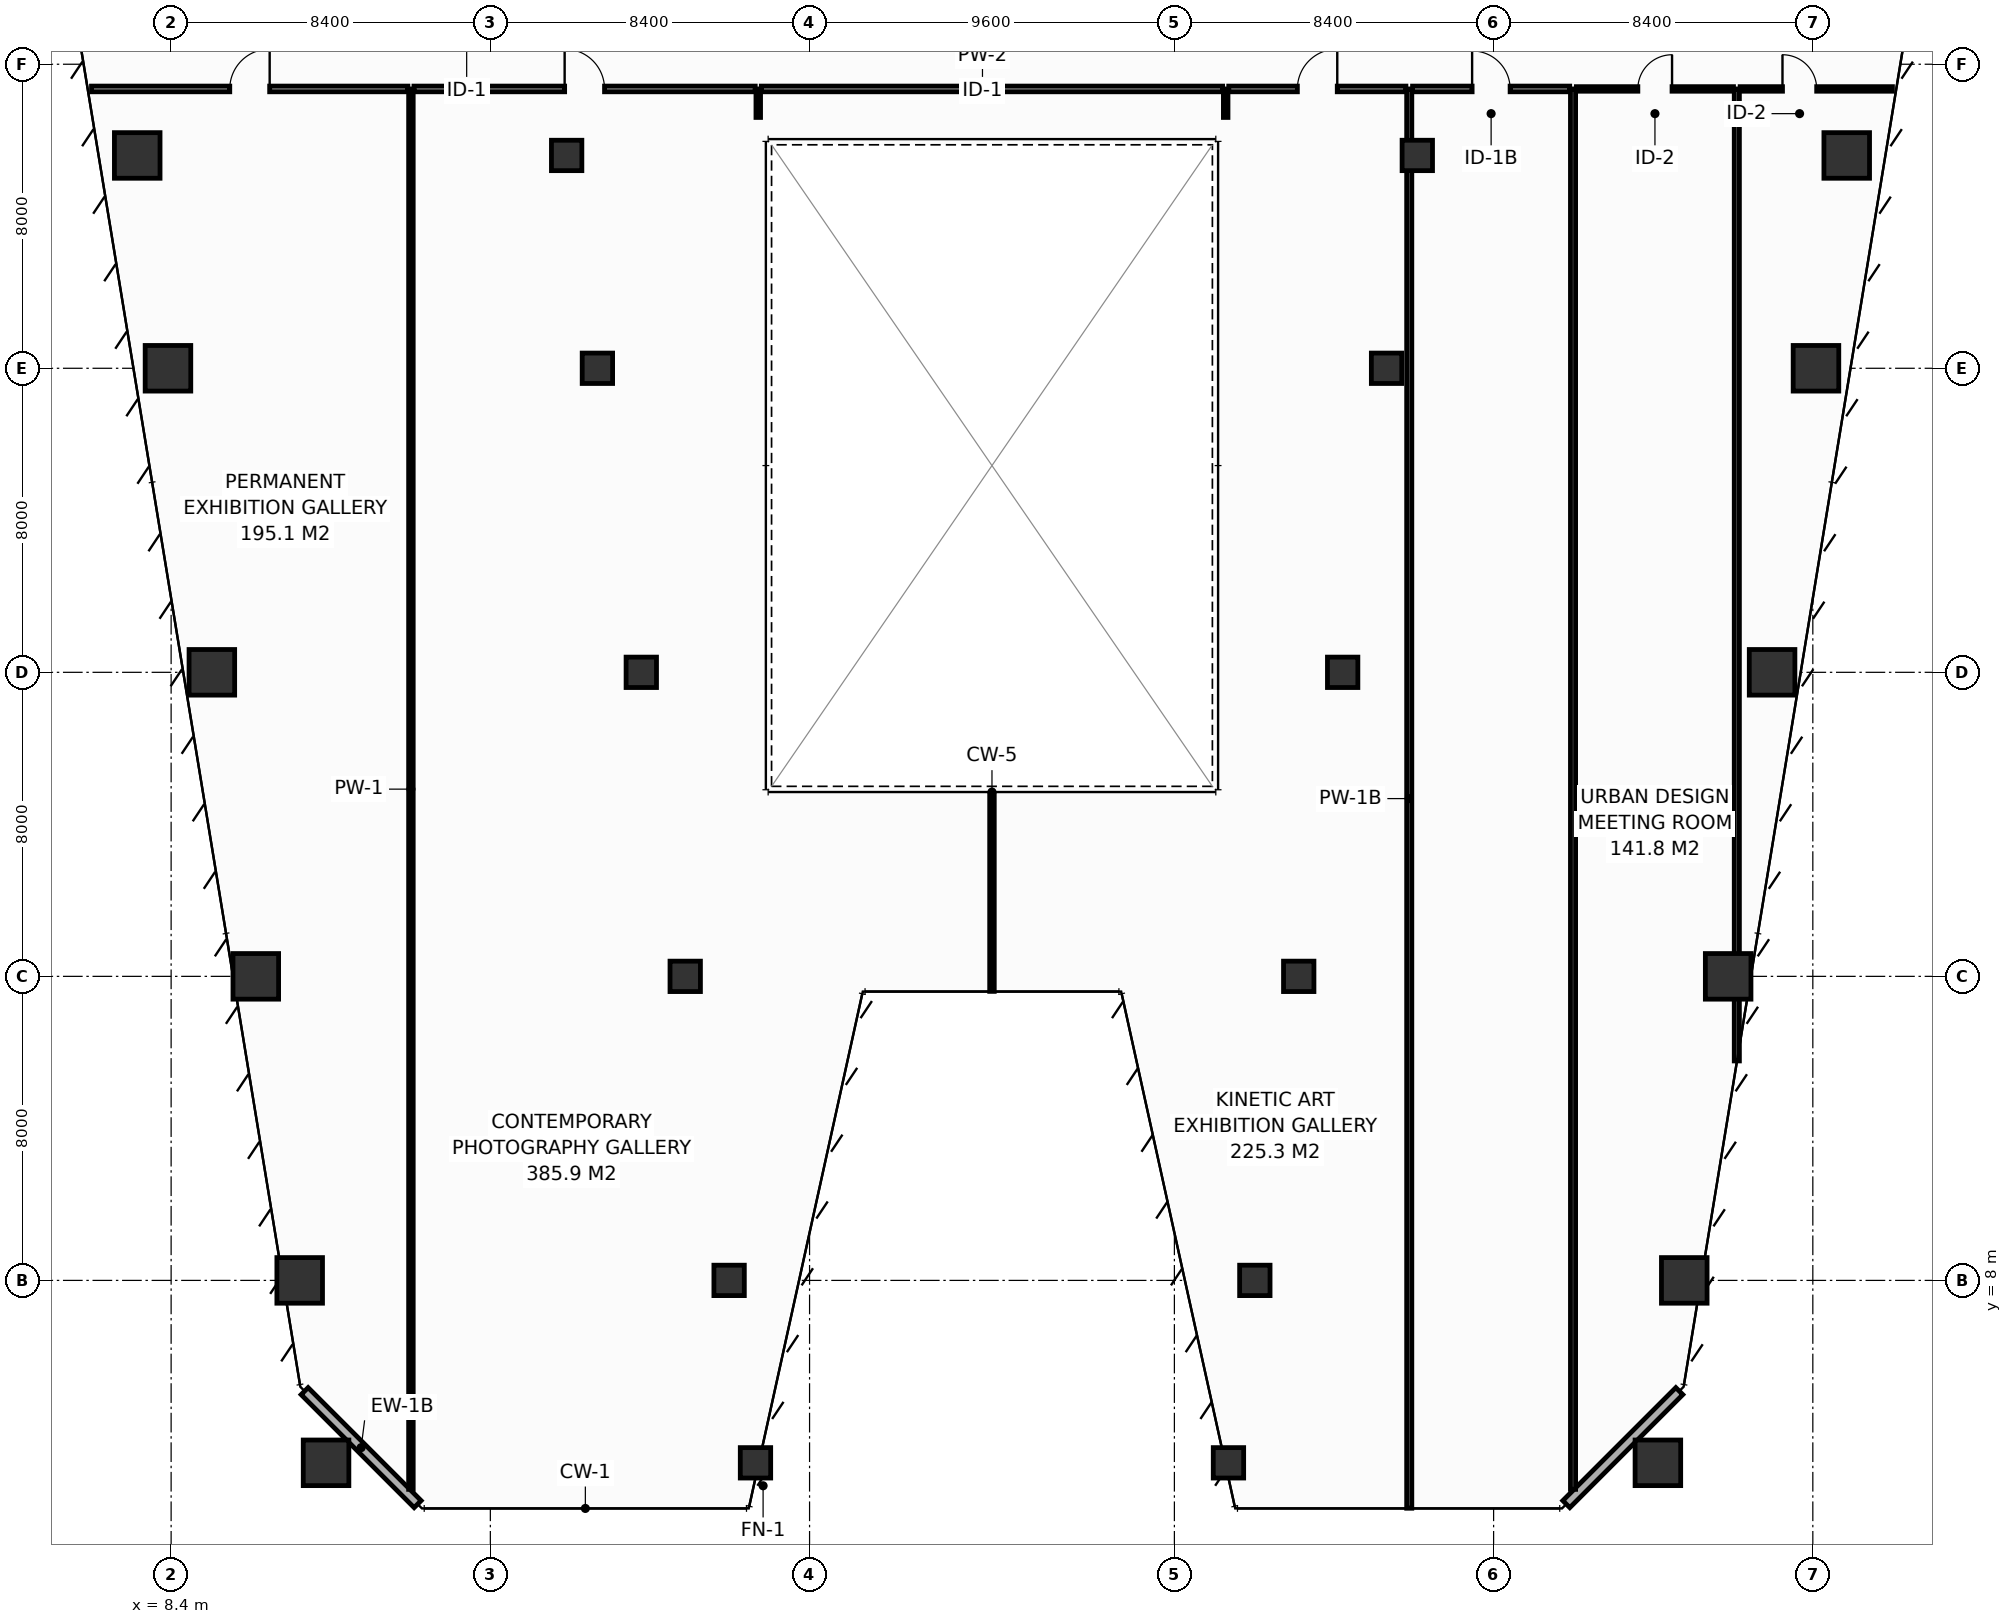
"""IFC4 building model, lengths in metres.
Left out: names, types, materials, properties, quantities, classifications, styles, units other than length and angle.
Written with IfcOpenShell. Run it as: python <this file> out.ifc"""

import sys

from ifc_helpers import new_model, si_unit, direction, frame, frame_2d, origin, origin_2d, place, context, subcontext, project, spatial, rectangle, hollow_rectangle, extrude, element, fill, save


model = new_model("IFC4")
c1 = context("Model", 3, precision=1e-05, world=origin(), true_north=direction((0.0, 1.0)))
c2 = subcontext(c1, "Body", "Model", "MODEL_VIEW")
j1 = project(units=[si_unit("LENGTHUNIT", "METRE"), si_unit("PLANEANGLEUNIT", "RADIAN")], contexts=[c1])
p1 = place(None, origin())
s1 = spatial("IfcSite", under=j1, at=p1, CompositionType="ELEMENT")
p2 = place(p1, origin())
s2 = spatial("IfcBuilding", under=s1, at=p2, CompositionType="ELEMENT")
p3 = place(p2, frame((0.0, 0.0, 64.8)))
s3 = spatial("IfcBuildingStorey", under=s2, at=p3, CompositionType="ELEMENT", Elevation=64.8)
for number, where, z_axis, x_axis in (
    (1, (12.477, 3.2, 0.0), (0.0, 0.0, 1.0), (1.0, 0.0, 0.0)),
    (2, (47.523, 3.2, 0.0), (0.0, 0.0, 1.0), (1.0, 0.0, 0.0)),
):
    element("IfcColumn", number, at=place(p3, frame(where, z_axis=z_axis, x_axis=x_axis)), inside=s3, PredefinedType="COLUMN", context=c2, shape_type="SweptSolid", body=[
        extrude(hollow_rectangle(XDim=1.2, YDim=1.2, WallThickness=0.055, at=origin_2d()), origin(), (0.0, 0.0, 1.0), 4.4),
    ])
for number, where, z_axis, x_axis in (
    (3, (23.777, 3.2, 0.0), (0.0, 0.0, 1.0), (1.0, 0.0, 0.0)),
    (4, (36.223, 3.2, 0.0), (0.0, 0.0, 1.0), (1.0, 0.0, 0.0)),
):
    element("IfcColumn", number, at=place(p3, frame(where, z_axis=z_axis, x_axis=x_axis)), inside=s3, PredefinedType="COLUMN", context=c2, shape_type="SweptSolid", body=[
        extrude(hollow_rectangle(XDim=0.8, YDim=0.8, WallThickness=0.036, at=origin_2d()), origin(), (0.0, 0.0, 1.0), 4.4),
    ])
for number, where, z_axis, x_axis in (
    (5, (11.783, 8.0, 0.0), (0.0, 0.0, 1.0), (1.0, 0.0, 0.0)),
    (6, (48.217, 8.0, 0.0), (0.0, 0.0, 1.0), (1.0, 0.0, 0.0)),
):
    element("IfcColumn", number, at=place(p3, frame(where, z_axis=z_axis, x_axis=x_axis)), inside=s3, PredefinedType="COLUMN", context=c2, shape_type="SweptSolid", body=[
        extrude(hollow_rectangle(XDim=1.2, YDim=1.2, WallThickness=0.055, at=origin_2d()), origin(), (0.0, 0.0, 1.0), 4.4),
    ])
for number, where, z_axis, x_axis in (
    (7, (23.083, 8.0, 0.0), (0.0, 0.0, 1.0), (1.0, 0.0, 0.0)),
    (8, (36.917, 8.0, 0.0), (0.0, 0.0, 1.0), (1.0, 0.0, 0.0)),
):
    element("IfcColumn", number, at=place(p3, frame(where, z_axis=z_axis, x_axis=x_axis)), inside=s3, PredefinedType="COLUMN", context=c2, shape_type="SweptSolid", body=[
        extrude(hollow_rectangle(XDim=0.8, YDim=0.8, WallThickness=0.036, at=origin_2d()), origin(), (0.0, 0.0, 1.0), 4.4),
    ])
for number, where, z_axis, x_axis in (
    (9, (10.628, 16.0, 0.0), (0.0, 0.0, 1.0), (1.0, 0.0, 0.0)),
    (10, (49.372, 16.0, 0.0), (0.0, 0.0, 1.0), (1.0, 0.0, 0.0)),
):
    element("IfcColumn", number, at=place(p3, frame(where, z_axis=z_axis, x_axis=x_axis)), inside=s3, PredefinedType="COLUMN", context=c2, shape_type="SweptSolid", body=[
        extrude(hollow_rectangle(XDim=1.2, YDim=1.2, WallThickness=0.055, at=origin_2d()), origin(), (0.0, 0.0, 1.0), 4.4),
    ])
for number, where, z_axis, x_axis in (
    (11, (21.928, 16.0, 0.0), (0.0, 0.0, 1.0), (1.0, 0.0, 0.0)),
    (12, (38.072, 16.0, 0.0), (0.0, 0.0, 1.0), (1.0, 0.0, 0.0)),
):
    element("IfcColumn", number, at=place(p3, frame(where, z_axis=z_axis, x_axis=x_axis)), inside=s3, PredefinedType="COLUMN", context=c2, shape_type="SweptSolid", body=[
        extrude(hollow_rectangle(XDim=0.8, YDim=0.8, WallThickness=0.036, at=origin_2d()), origin(), (0.0, 0.0, 1.0), 4.4),
    ])
for number, where, z_axis, x_axis in (
    (13, (9.472, 24.0, 0.0), (0.0, 0.0, 1.0), (1.0, 0.0, 0.0)),
    (14, (50.528, 24.0, 0.0), (0.0, 0.0, 1.0), (1.0, 0.0, 0.0)),
):
    element("IfcColumn", number, at=place(p3, frame(where, z_axis=z_axis, x_axis=x_axis)), inside=s3, PredefinedType="COLUMN", context=c2, shape_type="SweptSolid", body=[
        extrude(hollow_rectangle(XDim=1.2, YDim=1.2, WallThickness=0.055, at=origin_2d()), origin(), (0.0, 0.0, 1.0), 4.4),
    ])
for number, where, z_axis, x_axis in (
    (15, (20.772, 24.0, 0.0), (0.0, 0.0, 1.0), (1.0, 0.0, 0.0)),
    (16, (39.228, 24.0, 0.0), (0.0, 0.0, 1.0), (1.0, 0.0, 0.0)),
):
    element("IfcColumn", number, at=place(p3, frame(where, z_axis=z_axis, x_axis=x_axis)), inside=s3, PredefinedType="COLUMN", context=c2, shape_type="SweptSolid", body=[
        extrude(hollow_rectangle(XDim=0.8, YDim=0.8, WallThickness=0.036, at=origin_2d()), origin(), (0.0, 0.0, 1.0), 4.4),
    ])
for number, where, z_axis, x_axis in (
    (17, (8.317, 32.0, 0.0), (0.0, 0.0, 1.0), (1.0, 0.0, 0.0)),
    (18, (51.683, 32.0, 0.0), (0.0, 0.0, 1.0), (1.0, 0.0, 0.0)),
):
    element("IfcColumn", number, at=place(p3, frame(where, z_axis=z_axis, x_axis=x_axis)), inside=s3, PredefinedType="COLUMN", context=c2, shape_type="SweptSolid", body=[
        extrude(hollow_rectangle(XDim=1.2, YDim=1.2, WallThickness=0.055, at=origin_2d()), origin(), (0.0, 0.0, 1.0), 4.4),
    ])
for number, where, z_axis, x_axis in (
    (19, (19.617, 32.0, 0.0), (0.0, 0.0, 1.0), (1.0, 0.0, 0.0)),
    (20, (40.383, 32.0, 0.0), (0.0, 0.0, 1.0), (1.0, 0.0, 0.0)),
):
    element("IfcColumn", number, at=place(p3, frame(where, z_axis=z_axis, x_axis=x_axis)), inside=s3, PredefinedType="COLUMN", context=c2, shape_type="SweptSolid", body=[
        extrude(hollow_rectangle(XDim=0.8, YDim=0.8, WallThickness=0.036, at=origin_2d()), origin(), (0.0, 0.0, 1.0), 4.4),
    ])
for number, where, z_axis, x_axis in (
    (21, (7.508, 37.6, 0.0), (0.0, 0.0, 1.0), (1.0, 0.0, 0.0)),
    (22, (52.492, 37.6, 0.0), (0.0, 0.0, 1.0), (1.0, 0.0, 0.0)),
):
    element("IfcColumn", number, at=place(p3, frame(where, z_axis=z_axis, x_axis=x_axis)), inside=s3, PredefinedType="COLUMN", context=c2, shape_type="SweptSolid", body=[
        extrude(hollow_rectangle(XDim=1.2, YDim=1.2, WallThickness=0.055, at=origin_2d()), origin(), (0.0, 0.0, 1.0), 4.4),
    ])
for number, where, z_axis, x_axis in (
    (23, (18.808, 37.6, 0.0), (0.0, 0.0, 1.0), (1.0, 0.0, 0.0)),
    (24, (41.192, 37.6, 0.0), (0.0, 0.0, 1.0), (1.0, 0.0, 0.0)),
):
    element("IfcColumn", number, at=place(p3, frame(where, z_axis=z_axis, x_axis=x_axis)), inside=s3, PredefinedType="COLUMN", context=c2, shape_type="SweptSolid", body=[
        extrude(hollow_rectangle(XDim=0.8, YDim=0.8, WallThickness=0.036, at=origin_2d()), origin(), (0.0, 0.0, 1.0), 4.4),
    ])
for number, where, z_axis, x_axis in (
    (25, (11.913, 5.087, 0.0), (0.0, 0.0, 1.0), (0.707, -0.707, 0.0)),
    (26, (45.113, 2.113, 0.0), (0.0, 0.0, 1.0), (0.707, 0.707, 0.0)),
):
    element("IfcWall", number, at=place(p3, frame(where, z_axis=z_axis, x_axis=x_axis)), inside=s3, PredefinedType="STANDARD", context=c2, shape_type="SweptSolid", body=[
        extrude(rectangle(XDim=4.206, YDim=0.26, at=frame_2d((2.103, 0.0))), origin(), (0.0, 0.0, 1.0), 4.15),
    ])
p4 = place(p3, frame((14.71, 2.502, 0.0), z_axis=(0.0, 0.0, 1.0), x_axis=(0.0, 1.0, 0.0)))
e27 = element("IfcWall", 27, at=p4, inside=s3, PredefinedType="PARTITIONING", context=c2, shape_type="SweptSolid", body=[
    extrude(rectangle(XDim=36.848, YDim=0.12, at=frame_2d((18.424, 0.0))), origin(), (0.0, 0.0, 1.0), 3.335),
])
p5 = place(p3, frame((40.98, 2.005, 0.0), z_axis=(0.0, 0.0, 1.0), x_axis=(0.0, 1.0, 0.0)))
e28 = element("IfcWall", 28, at=p5, inside=s3, PredefinedType="PARTITIONING", context=c2, shape_type="SweptSolid", body=[
    extrude(rectangle(XDim=37.345, YDim=0.135, at=frame_2d((18.673, 0.0))), origin(), (0.0, 0.0, 1.0), 3.335),
])
p6 = place(p3, frame((45.29, 2.502, 0.0), z_axis=(0.0, 0.0, 1.0), x_axis=(0.0, 1.0, 0.0)))
e29 = element("IfcWall", 29, at=p6, inside=s3, PredefinedType="PARTITIONING", context=c2, shape_type="SweptSolid", body=[
    extrude(rectangle(XDim=36.848, YDim=0.135, at=frame_2d((18.424, 0.0))), origin(), (0.0, 0.0, 1.0), 3.335),
])
p7 = place(p3, frame((49.6, 13.774, 0.0), z_axis=(0.0, 0.0, 1.0), x_axis=(0.0, 1.0, 0.0)))
e30 = element("IfcWall", 30, at=p7, inside=s3, PredefinedType="PARTITIONING", context=c2, shape_type="SweptSolid", body=[
    extrude(rectangle(XDim=25.576, YDim=0.135, at=frame_2d((12.788, 0.0))), origin(), (0.0, 0.0, 1.0), 3.335),
])
for number, where, z_axis, x_axis in (
    (31, (23.85, 38.6, 0.0), (0.0, 0.0, 1.0), (0.0, 1.0, 0.0)),
    (32, (36.15, 38.6, 0.0), (0.0, 0.0, 1.0), (0.0, 1.0, 0.0)),
):
    element("IfcWall", number, at=place(p3, frame(where, z_axis=z_axis, x_axis=x_axis)), inside=s3, PredefinedType="PARTITIONING", context=c2, shape_type="SweptSolid", body=[
        extrude(rectangle(XDim=0.75, YDim=0.12, at=frame_2d((0.375, 0.0))), origin(), (0.0, 0.0, 1.0), 4.15),
    ])
p8 = place(p3, frame((30.0, 15.605, 0.0), z_axis=(0.0, 0.0, 1.0), x_axis=(0.0, 1.0, 0.0)))
e33 = element("IfcWall", 33, at=p8, inside=s3, PredefinedType="PARTITIONING", context=c2, shape_type="SweptSolid", body=[
    extrude(rectangle(XDim=5.175, YDim=0.12, at=frame_2d((2.587, 0.0))), origin(), (0.0, 0.0, 1.0), 4.15),
])
p9 = place(p3, frame((6.305, 39.35, 0.0), z_axis=(0.0, 0.0, 1.0), x_axis=(1.0, 0.0, 0.0)))
e34 = element("IfcWall", 34, at=p9, inside=s3, PredefinedType="PARTITIONING", context=c2, shape_type="SweptSolid", body=[
    extrude(rectangle(XDim=8.325, YDim=0.15, at=frame_2d((4.163, 0.0))), origin(), (0.0, 0.0, 1.0), 3.635),
])
p10 = place(p9, frame((3.638, 0.0, 0.0)))
e35 = element("IfcOpeningElement", 35, at=p10, cuts=e34, PredefinedType="OPENING", context=c2, shape_type="SweptSolid", body=[
    extrude(rectangle(XDim=1.05, YDim=2.15, at=frame_2d((0.525, 1.075))), frame((0.0, 0.085, 0.0), z_axis=(0.0, -1.0, 0.0), x_axis=(1.0, 0.0, 0.0)), (0.0, 0.0, 1.0), 0.17),
])
p11 = place(p3, frame((14.79, 39.35, 0.0), z_axis=(0.0, 0.0, 1.0), x_axis=(1.0, 0.0, 0.0)))
e36 = element("IfcWall", 36, at=p11, inside=s3, PredefinedType="PARTITIONING", context=c2, shape_type="SweptSolid", body=[
    extrude(rectangle(XDim=8.98, YDim=0.15, at=frame_2d((4.49, 0.0))), origin(), (0.0, 0.0, 1.0), 3.335),
])
p12 = place(p11, frame((3.965, 0.0, 0.0)))
e37 = element("IfcOpeningElement", 37, at=p12, cuts=e36, PredefinedType="OPENING", context=c2, shape_type="SweptSolid", body=[
    extrude(rectangle(XDim=1.05, YDim=2.15, at=frame_2d((0.525, 1.075))), frame((0.0, 0.085, 0.0), z_axis=(0.0, -1.0, 0.0), x_axis=(1.0, 0.0, 0.0)), (0.0, 0.0, 1.0), 0.17),
])
p13 = place(p3, frame((23.93, 39.35, 0.0), z_axis=(0.0, 0.0, 1.0), x_axis=(1.0, 0.0, 0.0)))
e38 = element("IfcWall", 38, at=p13, inside=s3, PredefinedType="PARTITIONING", context=c2, shape_type="SweptSolid", body=[
    extrude(rectangle(XDim=12.14, YDim=0.15, at=frame_2d((6.07, 0.0))), origin(), (0.0, 0.0, 1.0), 4.15),
])
p14 = place(p3, frame((36.23, 39.35, 0.0), z_axis=(0.0, 0.0, 1.0), x_axis=(1.0, 0.0, 0.0)))
e39 = element("IfcWall", 39, at=p14, inside=s3, PredefinedType="PARTITIONING", context=c2, shape_type="SweptSolid", body=[
    extrude(rectangle(XDim=4.663, YDim=0.15, at=frame_2d((2.331, 0.0))), origin(), (0.0, 0.0, 1.0), 3.335),
])
p15 = place(p14, frame((1.806, 0.0, 0.0)))
e40 = element("IfcOpeningElement", 40, at=p15, cuts=e39, PredefinedType="OPENING", context=c2, shape_type="SweptSolid", body=[
    extrude(rectangle(XDim=1.05, YDim=2.15, at=frame_2d((0.525, 1.075))), frame((0.0, 0.085, 0.0), z_axis=(0.0, -1.0, 0.0), x_axis=(1.0, 0.0, 0.0)), (0.0, 0.0, 1.0), 0.17),
])
p16 = place(p3, frame((41.067, 39.35, 0.0), z_axis=(0.0, 0.0, 1.0), x_axis=(1.0, 0.0, 0.0)))
e41 = element("IfcWall", 41, at=p16, inside=s3, PredefinedType="PARTITIONING", context=c2, shape_type="SweptSolid", body=[
    extrude(rectangle(XDim=4.135, YDim=0.15, at=frame_2d((2.067, 0.0))), origin(), (0.0, 0.0, 1.0), 4.15),
])
p17 = place(p16, frame((1.567, 0.0, 0.0)))
e42 = element("IfcOpeningElement", 42, at=p17, cuts=e41, PredefinedType="OPENING", context=c2, shape_type="SweptSolid", body=[
    extrude(rectangle(XDim=1.0, YDim=2.15, at=frame_2d((0.5, 1.075))), frame((0.0, 0.085, 0.0), z_axis=(0.0, -1.0, 0.0), x_axis=(1.0, 0.0, 0.0)), (0.0, 0.0, 1.0), 0.17),
])
p18 = place(p3, frame((45.377, 39.35, 0.0), z_axis=(0.0, 0.0, 1.0), x_axis=(1.0, 0.0, 0.0)))
e43 = element("IfcWall", 43, at=p18, inside=s3, PredefinedType="PARTITIONING", context=c2, shape_type="SweptSolid", body=[
    extrude(rectangle(XDim=4.135, YDim=0.12, at=frame_2d((2.067, 0.0))), origin(), (0.0, 0.0, 1.0), 4.15),
])
p19 = place(p18, frame((1.618, 0.0, 0.0)))
e44 = element("IfcOpeningElement", 44, at=p19, cuts=e43, PredefinedType="OPENING", context=c2, shape_type="SweptSolid", body=[
    extrude(rectangle(XDim=0.9, YDim=2.1, at=frame_2d((0.45, 1.05))), frame((0.0, 0.07, 0.0), z_axis=(0.0, -1.0, 0.0), x_axis=(1.0, 0.0, 0.0)), (0.0, 0.0, 1.0), 0.14),
])
p20 = place(p3, frame((49.688, 39.35, 0.0), z_axis=(0.0, 0.0, 1.0), x_axis=(1.0, 0.0, 0.0)))
e45 = element("IfcWall", 45, at=p20, inside=s3, PredefinedType="PARTITIONING", context=c2, shape_type="SweptSolid", body=[
    extrude(rectangle(XDim=4.008, YDim=0.12, at=frame_2d((2.004, 0.0))), origin(), (0.0, 0.0, 1.0), 3.635),
])
p21 = place(p20, frame((1.114, 0.0, 0.0)))
e46 = element("IfcOpeningElement", 46, at=p21, cuts=e45, PredefinedType="OPENING", context=c2, shape_type="SweptSolid", body=[
    extrude(rectangle(XDim=0.9, YDim=2.1, at=frame_2d((0.45, 1.05))), frame((0.0, 0.07, 0.0), z_axis=(0.0, -1.0, 0.0), x_axis=(1.0, 0.0, 0.0)), (0.0, 0.0, 1.0), 0.14),
])
p22 = place(p10, origin())
e47 = element("IfcDoor", 47, at=p22, inside=s3, OperationType="SINGLE_SWING_RIGHT", PredefinedType="DOOR", context=c2, shape_type="SweptSolid", body=[
    extrude(rectangle(XDim=1.05, YDim=2.15, at=frame_2d((0.525, 1.075))), frame((0.0, 0.025, 0.0), z_axis=(0.0, -1.0, 0.0), x_axis=(1.0, 0.0, 0.0)), (0.0, 0.0, 1.0), 0.05),
])
fill(e35, e47)
p23 = place(p12, origin())
e48 = element("IfcDoor", 48, at=p23, inside=s3, OperationType="SINGLE_SWING_LEFT", PredefinedType="DOOR", context=c2, shape_type="SweptSolid", body=[
    extrude(rectangle(XDim=1.05, YDim=2.15, at=frame_2d((0.525, 1.075))), frame((0.0, 0.025, 0.0), z_axis=(0.0, -1.0, 0.0), x_axis=(1.0, 0.0, 0.0)), (0.0, 0.0, 1.0), 0.05),
])
fill(e37, e48)
p24 = place(p15, origin())
e49 = element("IfcDoor", 49, at=p24, inside=s3, OperationType="SINGLE_SWING_RIGHT", PredefinedType="DOOR", context=c2, shape_type="SweptSolid", body=[
    extrude(rectangle(XDim=1.05, YDim=2.15, at=frame_2d((0.525, 1.075))), frame((0.0, 0.025, 0.0), z_axis=(0.0, -1.0, 0.0), x_axis=(1.0, 0.0, 0.0)), (0.0, 0.0, 1.0), 0.05),
])
fill(e40, e49)
p25 = place(p17, origin())
e50 = element("IfcDoor", 50, at=p25, inside=s3, OperationType="SINGLE_SWING_LEFT", PredefinedType="DOOR", context=c2, shape_type="SweptSolid", body=[
    extrude(rectangle(XDim=1.0, YDim=2.15, at=frame_2d((0.5, 1.075))), frame((0.0, 0.025, 0.0), z_axis=(0.0, -1.0, 0.0), x_axis=(1.0, 0.0, 0.0)), (0.0, 0.0, 1.0), 0.05),
])
fill(e42, e50)
p26 = place(p19, origin())
e51 = element("IfcDoor", 51, at=p26, inside=s3, OperationType="SINGLE_SWING_RIGHT", PredefinedType="DOOR", context=c2, shape_type="SweptSolid", body=[
    extrude(rectangle(XDim=0.9, YDim=2.1, at=frame_2d((0.45, 1.05))), frame((0.0, 0.025, 0.0), z_axis=(0.0, -1.0, 0.0), x_axis=(1.0, 0.0, 0.0)), (0.0, 0.0, 1.0), 0.05),
])
fill(e44, e51)
p27 = place(p21, origin())
e52 = element("IfcDoor", 52, at=p27, inside=s3, OperationType="SINGLE_SWING_LEFT", PredefinedType="DOOR", context=c2, shape_type="SweptSolid", body=[
    extrude(rectangle(XDim=0.9, YDim=2.1, at=frame_2d((0.45, 1.05))), frame((0.0, 0.025, 0.0), z_axis=(0.0, -1.0, 0.0), x_axis=(1.0, 0.0, 0.0)), (0.0, 0.0, 1.0), 0.05),
])
fill(e46, e52)
save(model, sys.argv[1])
